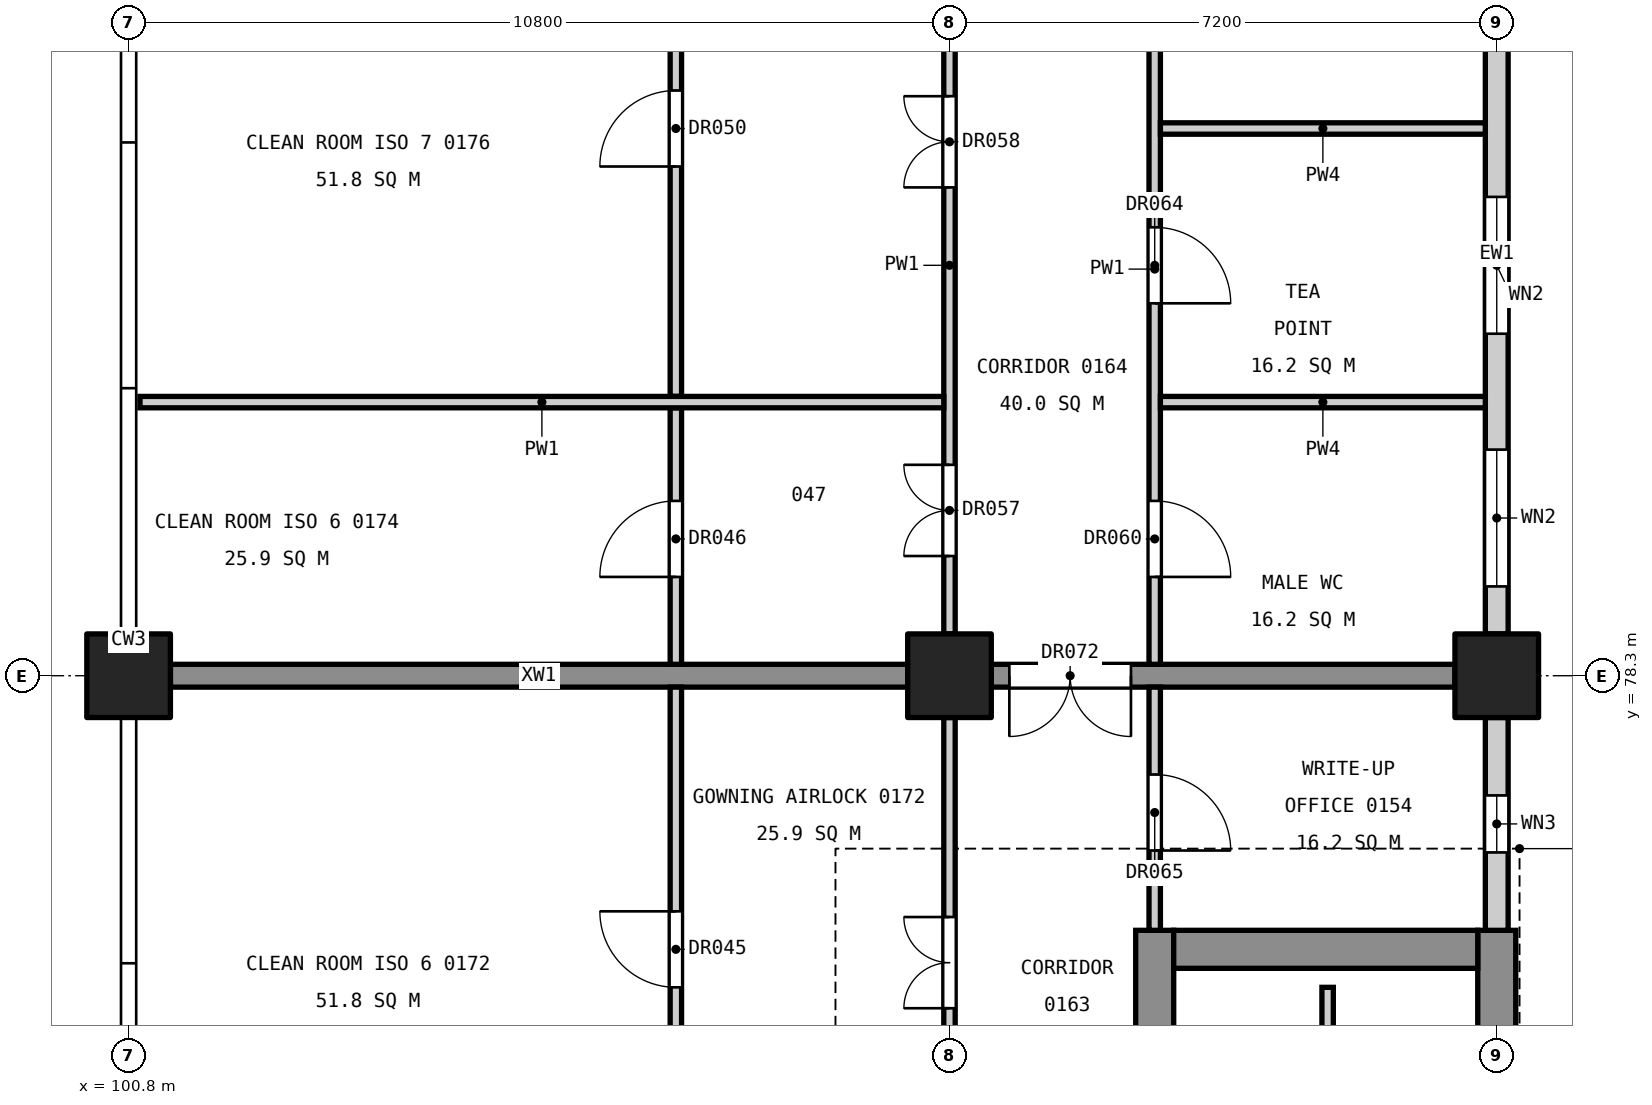
"""IFC4 building model, lengths in metres.
Left out: names, types, materials, properties, quantities, classifications, styles, units other than length and angle.
Written with IfcOpenShell. Run it as: python <this file> out.ifc"""

import sys

from ifc_helpers import new_model, si_unit, direction, frame, frame_2d, origin, origin_2d, place, context, subcontext, project, spatial, rectangle, extrude, element, fill, save


model = new_model("IFC4")
c1 = context("Model", 3, precision=1e-05, world=origin(), true_north=direction((0.0, 1.0)))
c2 = subcontext(c1, "Body", "Model", "MODEL_VIEW")
j1 = project(units=[si_unit("LENGTHUNIT", "METRE"), si_unit("PLANEANGLEUNIT", "RADIAN")], contexts=[c1])
p1 = place(None, origin())
s1 = spatial("IfcSite", under=j1, at=p1, CompositionType="ELEMENT")
p2 = place(p1, origin())
s2 = spatial("IfcBuilding", under=s1, at=p2, CompositionType="ELEMENT")
p3 = place(p2, frame((0.0, 0.0, 6.0)))
s3 = spatial("IfcBuildingStorey", under=s2, at=p3, CompositionType="ELEMENT", Elevation=6.0)
for number, where, z_axis, x_axis in (
    (1, (118.8, 78.3, 0.0), (0.0, 0.0, 1.0), (1.0, 0.0, 0.0)),
    (2, (111.6, 78.3, 0.0), (0.0, 0.0, 1.0), (1.0, 0.0, 0.0)),
    (3, (100.8, 78.3, 0.0), (0.0, 0.0, 1.0), (1.0, 0.0, 0.0)),
):
    element("IfcColumn", number, at=place(p3, frame(where, z_axis=z_axis, x_axis=x_axis)), inside=s3, PredefinedType="COLUMN", context=c2, shape_type="SweptSolid", body=[
        extrude(rectangle(XDim=1.1, YDim=1.1, at=origin_2d()), origin(), (0.0, 0.0, 1.0), 5.4),
    ])
p4 = place(p3, frame((118.8, 60.05, 0.0), z_axis=(0.0, 0.0, 1.0), x_axis=(0.0, 1.0, 0.0)))
e4 = element("IfcWall", 4, at=p4, inside=s3, PredefinedType="SHEAR", context=c2, shape_type="SweptSolid", body=[
    extrude(rectangle(XDim=14.9, YDim=0.5, at=frame_2d((7.45, 0.0))), origin(), (0.0, 0.0, 1.0), 5.1),
])
p5 = place(p4, frame((6.3, 0.0, 3.4)))
e5 = element("IfcOpeningElement", 5, at=p5, cuts=e4, PredefinedType="OPENING", context=c2, shape_type="SweptSolid", body=[
    extrude(rectangle(XDim=1.2, YDim=0.9, at=frame_2d((0.6, 0.45))), frame((0.0, 0.26, 0.0), z_axis=(0.0, -1.0, 0.0), x_axis=(1.0, 0.0, 0.0)), (0.0, 0.0, 1.0), 0.52),
])
p6 = place(p3, frame((114.3, 60.05, 0.0), z_axis=(0.0, 0.0, 1.0), x_axis=(0.0, 1.0, 0.0)))
e6 = element("IfcWall", 6, at=p6, inside=s3, PredefinedType="SHEAR", context=c2, shape_type="SweptSolid", body=[
    extrude(rectangle(XDim=14.9, YDim=0.5, at=frame_2d((7.45, 0.0))), origin(), (0.0, 0.0, 1.0), 5.1),
])
p7 = place(p6, frame((0.55, 0.0, 0.0)))
e7 = element("IfcOpeningElement", 7, at=p7, cuts=e6, PredefinedType="OPENING", context=c2, shape_type="SweptSolid", body=[
    extrude(rectangle(XDim=1.4, YDim=2.1, at=frame_2d((0.7, 1.05))), frame((0.0, 0.26, 0.0), z_axis=(0.0, -1.0, 0.0), x_axis=(1.0, 0.0, 0.0)), (0.0, 0.0, 1.0), 0.52),
])
p8 = place(p6, frame((8.85, 0.0, 0.0)))
e8 = element("IfcOpeningElement", 8, at=p8, cuts=e6, PredefinedType="OPENING", context=c2, shape_type="SweptSolid", body=[
    extrude(rectangle(XDim=1.1, YDim=2.1, at=frame_2d((0.55, 1.05))), frame((0.0, 0.26, 0.0), z_axis=(0.0, -1.0, 0.0), x_axis=(1.0, 0.0, 0.0)), (0.0, 0.0, 1.0), 0.52),
])
p9 = place(p6, frame((11.4, 0.0, 0.0)))
e9 = element("IfcOpeningElement", 9, at=p9, cuts=e6, PredefinedType="OPENING", context=c2, shape_type="SweptSolid", body=[
    extrude(rectangle(XDim=1.1, YDim=2.1, at=frame_2d((0.55, 1.05))), frame((0.0, 0.26, 0.0), z_axis=(0.0, -1.0, 0.0), x_axis=(1.0, 0.0, 0.0)), (0.0, 0.0, 1.0), 0.52),
])
p10 = place(p3, frame((118.55, 74.7, 0.0), z_axis=(0.0, 0.0, 1.0), x_axis=(-1.0, 0.0, 0.0)))
e10 = element("IfcWall", 10, at=p10, inside=s3, PredefinedType="SHEAR", context=c2, shape_type="SweptSolid", body=[
    extrude(rectangle(XDim=4.0, YDim=0.5, at=frame_2d((2.0, 0.0))), origin(), (0.0, 0.0, 1.0), 5.1),
])
p11 = place(p3, frame((118.25, 78.3, 0.0), z_axis=(0.0, 0.0, 1.0), x_axis=(-1.0, 0.0, 0.0)))
e11 = element("IfcWall", 11, at=p11, inside=s3, PredefinedType="SHEAR", context=c2, shape_type="SweptSolid", body=[
    extrude(rectangle(XDim=6.1, YDim=0.3, at=frame_2d((3.05, 0.0))), origin(), (0.0, 0.0, 1.0), 5.1),
])
p12 = place(p11, frame((4.262, 0.0, 0.0)))
e12 = element("IfcOpeningElement", 12, at=p12, cuts=e11, PredefinedType="OPENING", context=c2, shape_type="SweptSolid", body=[
    extrude(rectangle(XDim=1.6, YDim=2.1, at=frame_2d((0.8, 1.05))), frame((0.0, 0.16, 0.0), z_axis=(0.0, -1.0, 0.0), x_axis=(1.0, 0.0, 0.0)), (0.0, 0.0, 1.0), 0.32),
])
p13 = place(p3, frame((111.05, 78.3, 0.0), z_axis=(0.0, 0.0, 1.0), x_axis=(-1.0, 0.0, 0.0)))
e13 = element("IfcWall", 13, at=p13, inside=s3, PredefinedType="SHEAR", context=c2, shape_type="SweptSolid", body=[
    extrude(rectangle(XDim=9.7, YDim=0.3, at=frame_2d((4.85, 0.0))), origin(), (0.0, 0.0, 1.0), 5.1),
])
p14 = place(p3, frame((116.575, 73.3, 0.0), z_axis=(0.0, 0.0, 1.0), x_axis=(0.0, 1.0, 0.0)))
e14 = element("IfcWall", 14, at=p14, inside=s3, PredefinedType="SOLIDWALL", context=c2, shape_type="SweptSolid", body=[
    extrude(rectangle(XDim=0.9, YDim=0.15, at=frame_2d((0.45, 0.0))), origin(), (0.0, 0.0, 1.0), 5.4),
])
p15 = place(p3, frame((118.8, 74.95, 0.0), z_axis=(0.0, 0.0, 1.0), x_axis=(0.0, 1.0, 0.0)))
e15 = element("IfcWall", 15, at=p15, inside=s3, PredefinedType="STANDARD", context=c2, shape_type="SweptSolid", body=[
    extrude(rectangle(XDim=2.8, YDim=0.3, at=frame_2d((1.4, 0.0))), origin(), (0.0, 0.0, 1.0), 4.1),
])
p16 = place(p15, frame((1.025, 0.0, 0.8)))
e16 = element("IfcOpeningElement", 16, at=p16, cuts=e15, PredefinedType="OPENING", context=c2, shape_type="SweptSolid", body=[
    extrude(rectangle(XDim=0.75, YDim=1.2, at=frame_2d((0.375, 0.6))), frame((0.0, 0.16, 0.0), z_axis=(0.0, -1.0, 0.0), x_axis=(1.0, 0.0, 0.0)), (0.0, 0.0, 1.0), 0.32),
])
p17 = place(p3, frame((118.8, 78.85, 0.0), z_axis=(0.0, 0.0, 1.0), x_axis=(0.0, 1.0, 0.0)))
e17 = element("IfcWall", 17, at=p17, inside=s3, PredefinedType="STANDARD", context=c2, shape_type="SweptSolid", body=[
    extrude(rectangle(XDim=10.0, YDim=0.3, at=frame_2d((5.0, 0.0))), origin(), (0.0, 0.0, 1.0), 4.1),
])
p18 = place(p17, frame((0.625, 0.0, 0.9)))
e18 = element("IfcOpeningElement", 18, at=p18, cuts=e17, PredefinedType="OPENING", context=c2, shape_type="SweptSolid", body=[
    extrude(rectangle(XDim=1.8, YDim=3.0, at=frame_2d((0.9, 1.5))), frame((0.0, 0.16, 0.0), z_axis=(0.0, -1.0, 0.0), x_axis=(1.0, 0.0, 0.0)), (0.0, 0.0, 1.0), 0.32),
])
p19 = place(p17, frame((3.95, 0.0, 0.9)))
e19 = element("IfcOpeningElement", 19, at=p19, cuts=e17, PredefinedType="OPENING", context=c2, shape_type="SweptSolid", body=[
    extrude(rectangle(XDim=1.8, YDim=3.0, at=frame_2d((0.9, 1.5))), frame((0.0, 0.16, 0.0), z_axis=(0.0, -1.0, 0.0), x_axis=(1.0, 0.0, 0.0)), (0.0, 0.0, 1.0), 0.32),
])
p20 = place(p17, frame((7.95, 0.0, 0.8)))
e20 = element("IfcOpeningElement", 20, at=p20, cuts=e17, PredefinedType="OPENING", context=c2, shape_type="SweptSolid", body=[
    extrude(rectangle(XDim=0.75, YDim=1.2, at=frame_2d((0.375, 0.6))), frame((0.0, 0.16, 0.0), z_axis=(0.0, -1.0, 0.0), x_axis=(1.0, 0.0, 0.0)), (0.0, 0.0, 1.0), 0.32),
])
p21 = place(p3, frame((114.3, 74.95, 0.0), z_axis=(0.0, 0.0, 1.0), x_axis=(0.0, 1.0, 0.0)))
e21 = element("IfcWall", 21, at=p21, inside=s3, PredefinedType="PARTITIONING", context=c2, shape_type="SweptSolid", body=[
    extrude(rectangle(XDim=3.2, YDim=0.15, at=frame_2d((1.6, 0.0))), origin(), (0.0, 0.0, 1.0), 4.0),
])
p22 = place(p21, frame((1.05, 0.0, 0.0)))
e22 = element("IfcOpeningElement", 22, at=p22, cuts=e21, PredefinedType="OPENING", context=c2, shape_type="SweptSolid", body=[
    extrude(rectangle(XDim=1.0, YDim=2.1, at=frame_2d((0.5, 1.05))), frame((0.0, 0.085, 0.0), z_axis=(0.0, -1.0, 0.0), x_axis=(1.0, 0.0, 0.0)), (0.0, 0.0, 1.0), 0.17),
])
p23 = place(p3, frame((114.3, 78.45, 0.0), z_axis=(0.0, 0.0, 1.0), x_axis=(0.0, 1.0, 0.0)))
e23 = element("IfcWall", 23, at=p23, inside=s3, PredefinedType="PARTITIONING", context=c2, shape_type="SweptSolid", body=[
    extrude(rectangle(XDim=10.4, YDim=0.15, at=frame_2d((5.2, 0.0))), origin(), (0.0, 0.0, 1.0), 4.0),
])
p24 = place(p23, frame((8.35, 0.0, 0.0)))
e24 = element("IfcOpeningElement", 24, at=p24, cuts=e23, PredefinedType="OPENING", context=c2, shape_type="SweptSolid", body=[
    extrude(rectangle(XDim=1.0, YDim=2.1, at=frame_2d((0.5, 1.05))), frame((0.0, 0.085, 0.0), z_axis=(0.0, -1.0, 0.0), x_axis=(1.0, 0.0, 0.0)), (0.0, 0.0, 1.0), 0.17),
])
p25 = place(p23, frame((1.15, 0.0, 0.0)))
e25 = element("IfcOpeningElement", 25, at=p25, cuts=e23, PredefinedType="OPENING", context=c2, shape_type="SweptSolid", body=[
    extrude(rectangle(XDim=1.0, YDim=2.1, at=frame_2d((0.5, 1.05))), frame((0.0, 0.085, 0.0), z_axis=(0.0, -1.0, 0.0), x_axis=(1.0, 0.0, 0.0)), (0.0, 0.0, 1.0), 0.17),
])
p26 = place(p23, frame((4.75, 0.0, 0.0)))
e26 = element("IfcOpeningElement", 26, at=p26, cuts=e23, PredefinedType="OPENING", context=c2, shape_type="SweptSolid", body=[
    extrude(rectangle(XDim=1.0, YDim=2.1, at=frame_2d((0.5, 1.05))), frame((0.0, 0.085, 0.0), z_axis=(0.0, -1.0, 0.0), x_axis=(1.0, 0.0, 0.0)), (0.0, 0.0, 1.0), 0.17),
])
for number, where, z_axis, x_axis in (
    (27, (118.65, 81.9, 0.0), (0.0, 0.0, 1.0), (-1.0, 0.0, 0.0)),
    (28, (118.65, 85.5, 0.0), (0.0, 0.0, 1.0), (-1.0, 0.0, 0.0)),
):
    element("IfcWall", number, at=place(p3, frame(where, z_axis=z_axis, x_axis=x_axis)), inside=s3, PredefinedType="PARTITIONING", context=c2, shape_type="SweptSolid", body=[
        extrude(rectangle(XDim=4.275, YDim=0.15, at=frame_2d((2.137, 0.0))), origin(), (0.0, 0.0, 1.0), 4.3),
    ])
p27 = place(p3, frame((111.6, 70.8, 0.0), z_axis=(0.0, 0.0, 1.0), x_axis=(0.0, 1.0, 0.0)))
e29 = element("IfcWall", 29, at=p27, inside=s3, PredefinedType="PARTITIONING", context=c2, shape_type="SweptSolid", body=[
    extrude(rectangle(XDim=6.95, YDim=0.15, at=frame_2d((3.475, 0.0))), origin(), (0.0, 0.0, 1.0), 4.0),
])
p28 = place(p27, frame((3.125, 0.0, 0.0)))
e30 = element("IfcOpeningElement", 30, at=p28, cuts=e29, PredefinedType="OPENING", context=c2, shape_type="SweptSolid", body=[
    extrude(rectangle(XDim=1.2, YDim=2.1, at=frame_2d((0.6, 1.05))), frame((0.0, 0.085, 0.0), z_axis=(0.0, -1.0, 0.0), x_axis=(1.0, 0.0, 0.0)), (0.0, 0.0, 1.0), 0.17),
])
p29 = place(p3, frame((111.6, 78.85, 0.0), z_axis=(0.0, 0.0, 1.0), x_axis=(0.0, 1.0, 0.0)))
e31 = element("IfcWall", 31, at=p29, inside=s3, PredefinedType="PARTITIONING", context=c2, shape_type="SweptSolid", body=[
    extrude(rectangle(XDim=9.7, YDim=0.15, at=frame_2d((4.85, 0.0))), origin(), (0.0, 0.0, 1.0), 4.0),
])
p30 = place(p29, frame((1.025, 0.0, 0.0)))
e32 = element("IfcOpeningElement", 32, at=p30, cuts=e31, PredefinedType="OPENING", context=c2, shape_type="SweptSolid", body=[
    extrude(rectangle(XDim=1.2, YDim=2.1, at=frame_2d((0.6, 1.05))), frame((0.0, 0.085, 0.0), z_axis=(0.0, -1.0, 0.0), x_axis=(1.0, 0.0, 0.0)), (0.0, 0.0, 1.0), 0.17),
])
p31 = place(p29, frame((5.875, 0.0, 0.0)))
e33 = element("IfcOpeningElement", 33, at=p31, cuts=e31, PredefinedType="OPENING", context=c2, shape_type="SweptSolid", body=[
    extrude(rectangle(XDim=1.2, YDim=2.1, at=frame_2d((0.6, 1.05))), frame((0.0, 0.085, 0.0), z_axis=(0.0, -1.0, 0.0), x_axis=(1.0, 0.0, 0.0)), (0.0, 0.0, 1.0), 0.17),
])
p32 = place(p3, frame((108.0, 71.175, 0.0), z_axis=(0.0, 0.0, 1.0), x_axis=(0.0, 1.0, 0.0)))
e34 = element("IfcWall", 34, at=p32, inside=s3, PredefinedType="PARTITIONING", context=c2, shape_type="SweptSolid", body=[
    extrude(rectangle(XDim=6.975, YDim=0.15, at=frame_2d((3.487, 0.0))), origin(), (0.0, 0.0, 1.0), 4.0),
])
p33 = place(p32, frame((3.025, 0.0, 0.0)))
e35 = element("IfcOpeningElement", 35, at=p33, cuts=e34, PredefinedType="OPENING", context=c2, shape_type="SweptSolid", body=[
    extrude(rectangle(XDim=1.0, YDim=2.1, at=frame_2d((0.5, 1.05))), frame((0.0, 0.085, 0.0), z_axis=(0.0, -1.0, 0.0), x_axis=(1.0, 0.0, 0.0)), (0.0, 0.0, 1.0), 0.17),
])
p34 = place(p3, frame((108.0, 78.45, 0.0), z_axis=(0.0, 0.0, 1.0), x_axis=(0.0, 1.0, 0.0)))
e36 = element("IfcWall", 36, at=p34, inside=s3, PredefinedType="PARTITIONING", context=c2, shape_type="SweptSolid", body=[
    extrude(rectangle(XDim=3.375, YDim=0.15, at=frame_2d((1.688, 0.0))), origin(), (0.0, 0.0, 1.0), 4.0),
])
p35 = place(p34, frame((1.15, 0.0, 0.0)))
e37 = element("IfcOpeningElement", 37, at=p35, cuts=e36, PredefinedType="OPENING", context=c2, shape_type="SweptSolid", body=[
    extrude(rectangle(XDim=1.0, YDim=2.1, at=frame_2d((0.5, 1.05))), frame((0.0, 0.085, 0.0), z_axis=(0.0, -1.0, 0.0), x_axis=(1.0, 0.0, 0.0)), (0.0, 0.0, 1.0), 0.17),
])
p36 = place(p3, frame((108.0, 81.975, 0.0), z_axis=(0.0, 0.0, 1.0), x_axis=(0.0, 1.0, 0.0)))
e38 = element("IfcWall", 38, at=p36, inside=s3, PredefinedType="PARTITIONING", context=c2, shape_type="SweptSolid", body=[
    extrude(rectangle(XDim=7.05, YDim=0.15, at=frame_2d((3.525, 0.0))), origin(), (0.0, 0.0, 1.0), 4.0),
])
p37 = place(p36, frame((3.025, 0.0, 0.0)))
e39 = element("IfcOpeningElement", 39, at=p37, cuts=e38, PredefinedType="OPENING", context=c2, shape_type="SweptSolid", body=[
    extrude(rectangle(XDim=1.0, YDim=2.1, at=frame_2d((0.5, 1.05))), frame((0.0, 0.085, 0.0), z_axis=(0.0, -1.0, 0.0), x_axis=(1.0, 0.0, 0.0)), (0.0, 0.0, 1.0), 0.17),
])
p38 = place(p3, frame((111.525, 81.9, 0.0), z_axis=(0.0, 0.0, 1.0), x_axis=(-1.0, 0.0, 0.0)))
e40 = element("IfcWall", 40, at=p38, inside=s3, PredefinedType="PARTITIONING", context=c2, shape_type="SweptSolid", body=[
    extrude(rectangle(XDim=10.575, YDim=0.15, at=frame_2d((5.288, 0.0))), origin(), (0.0, 0.0, 1.0), 4.3),
])
p39 = place(p16, origin())
e41 = element("IfcWindow", 41, at=p39, inside=s3, PartitioningType="SINGLE_PANEL", PredefinedType="WINDOW", context=c2, shape_type="SweptSolid", body=[
    extrude(rectangle(XDim=0.75, YDim=1.2, at=frame_2d((0.375, 0.6))), frame((0.0, 0.03, 0.0), z_axis=(0.0, -1.0, 0.0), x_axis=(1.0, 0.0, 0.0)), (0.0, 0.0, 1.0), 0.06),
])
fill(e16, e41)
p40 = place(p18, origin())
e42 = element("IfcWindow", 42, at=p40, inside=s3, PartitioningType="SINGLE_PANEL", PredefinedType="WINDOW", context=c2, shape_type="SweptSolid", body=[
    extrude(rectangle(XDim=1.8, YDim=3.0, at=frame_2d((0.9, 1.5))), frame((0.0, 0.03, 0.0), z_axis=(0.0, -1.0, 0.0), x_axis=(1.0, 0.0, 0.0)), (0.0, 0.0, 1.0), 0.06),
])
fill(e18, e42)
p41 = place(p19, origin())
e43 = element("IfcWindow", 43, at=p41, inside=s3, PartitioningType="SINGLE_PANEL", PredefinedType="WINDOW", context=c2, shape_type="SweptSolid", body=[
    extrude(rectangle(XDim=1.8, YDim=3.0, at=frame_2d((0.9, 1.5))), frame((0.0, 0.03, 0.0), z_axis=(0.0, -1.0, 0.0), x_axis=(1.0, 0.0, 0.0)), (0.0, 0.0, 1.0), 0.06),
])
fill(e19, e43)
p42 = place(p33, origin())
e44 = element("IfcDoor", 44, at=p42, inside=s3, OperationType="SINGLE_SWING_RIGHT", PredefinedType="DOOR", context=c2, shape_type="SweptSolid", body=[
    extrude(rectangle(XDim=1.0, YDim=2.1, at=frame_2d((0.5, 1.05))), frame((0.0, 0.025, 0.0), z_axis=(0.0, -1.0, 0.0), x_axis=(1.0, 0.0, 0.0)), (0.0, 0.0, 1.0), 0.05),
])
fill(e35, e44)
p43 = place(p35, origin())
e45 = element("IfcDoor", 45, at=p43, inside=s3, OperationType="SINGLE_SWING_LEFT", PredefinedType="DOOR", context=c2, shape_type="SweptSolid", body=[
    extrude(rectangle(XDim=1.0, YDim=2.1, at=frame_2d((0.5, 1.05))), frame((0.0, 0.025, 0.0), z_axis=(0.0, -1.0, 0.0), x_axis=(1.0, 0.0, 0.0)), (0.0, 0.0, 1.0), 0.05),
])
fill(e37, e45)
p44 = place(p37, origin())
e46 = element("IfcDoor", 46, at=p44, inside=s3, OperationType="SINGLE_SWING_LEFT", PredefinedType="DOOR", context=c2, shape_type="SweptSolid", body=[
    extrude(rectangle(XDim=1.0, YDim=2.1, at=frame_2d((0.5, 1.05))), frame((0.0, 0.025, 0.0), z_axis=(0.0, -1.0, 0.0), x_axis=(1.0, 0.0, 0.0)), (0.0, 0.0, 1.0), 0.05),
])
fill(e39, e46)
p45 = place(p28, origin())
e47 = element("IfcDoor", 47, at=p45, inside=s3, OperationType="DOUBLE_DOOR_SINGLE_SWING", PredefinedType="DOOR", context=c2, shape_type="SweptSolid", body=[
    extrude(rectangle(XDim=1.2, YDim=2.1, at=frame_2d((0.6, 1.05))), frame((0.0, 0.025, 0.0), z_axis=(0.0, -1.0, 0.0), x_axis=(1.0, 0.0, 0.0)), (0.0, 0.0, 1.0), 0.05),
])
fill(e30, e47)
p46 = place(p30, origin())
e48 = element("IfcDoor", 48, at=p46, inside=s3, OperationType="DOUBLE_DOOR_SINGLE_SWING", PredefinedType="DOOR", context=c2, shape_type="SweptSolid", body=[
    extrude(rectangle(XDim=1.2, YDim=2.1, at=frame_2d((0.6, 1.05))), frame((0.0, 0.025, 0.0), z_axis=(0.0, -1.0, 0.0), x_axis=(1.0, 0.0, 0.0)), (0.0, 0.0, 1.0), 0.05),
])
fill(e32, e48)
p47 = place(p31, origin())
e49 = element("IfcDoor", 49, at=p47, inside=s3, OperationType="DOUBLE_DOOR_SINGLE_SWING", PredefinedType="DOOR", context=c2, shape_type="SweptSolid", body=[
    extrude(rectangle(XDim=1.2, YDim=2.1, at=frame_2d((0.6, 1.05))), frame((0.0, 0.025, 0.0), z_axis=(0.0, -1.0, 0.0), x_axis=(1.0, 0.0, 0.0)), (0.0, 0.0, 1.0), 0.05),
])
fill(e33, e49)
p48 = place(p25, frame((1.0, 0.0, 0.0), z_axis=(0.0, 0.0, 1.0), x_axis=(-1.0, 0.0, 0.0)))
e50 = element("IfcDoor", 50, at=p48, inside=s3, OperationType="SINGLE_SWING_RIGHT", PredefinedType="DOOR", context=c2, shape_type="SweptSolid", body=[
    extrude(rectangle(XDim=1.0, YDim=2.1, at=frame_2d((0.5, 1.05))), frame((0.0, 0.025, 0.0), z_axis=(0.0, -1.0, 0.0), x_axis=(1.0, 0.0, 0.0)), (0.0, 0.0, 1.0), 0.05),
])
fill(e25, e50)
p49 = place(p26, frame((1.0, 0.0, 0.0), z_axis=(0.0, 0.0, 1.0), x_axis=(-1.0, 0.0, 0.0)))
e51 = element("IfcDoor", 51, at=p49, inside=s3, OperationType="SINGLE_SWING_RIGHT", PredefinedType="DOOR", context=c2, shape_type="SweptSolid", body=[
    extrude(rectangle(XDim=1.0, YDim=2.1, at=frame_2d((0.5, 1.05))), frame((0.0, 0.025, 0.0), z_axis=(0.0, -1.0, 0.0), x_axis=(1.0, 0.0, 0.0)), (0.0, 0.0, 1.0), 0.05),
])
fill(e26, e51)
p50 = place(p22, frame((1.0, 0.0, 0.0), z_axis=(0.0, 0.0, 1.0), x_axis=(-1.0, 0.0, 0.0)))
e52 = element("IfcDoor", 52, at=p50, inside=s3, OperationType="SINGLE_SWING_RIGHT", PredefinedType="DOOR", context=c2, shape_type="SweptSolid", body=[
    extrude(rectangle(XDim=1.0, YDim=2.1, at=frame_2d((0.5, 1.05))), frame((0.0, 0.025, 0.0), z_axis=(0.0, -1.0, 0.0), x_axis=(1.0, 0.0, 0.0)), (0.0, 0.0, 1.0), 0.05),
])
fill(e22, e52)
p51 = place(p12, origin())
e53 = element("IfcDoor", 53, at=p51, inside=s3, OperationType="DOUBLE_DOOR_SINGLE_SWING", PredefinedType="DOOR", context=c2, shape_type="SweptSolid", body=[
    extrude(rectangle(XDim=1.6, YDim=2.1, at=frame_2d((0.8, 1.05))), frame((0.0, 0.025, 0.0), z_axis=(0.0, -1.0, 0.0), x_axis=(1.0, 0.0, 0.0)), (0.0, 0.0, 1.0), 0.05),
])
fill(e12, e53)
save(model, sys.argv[1])
